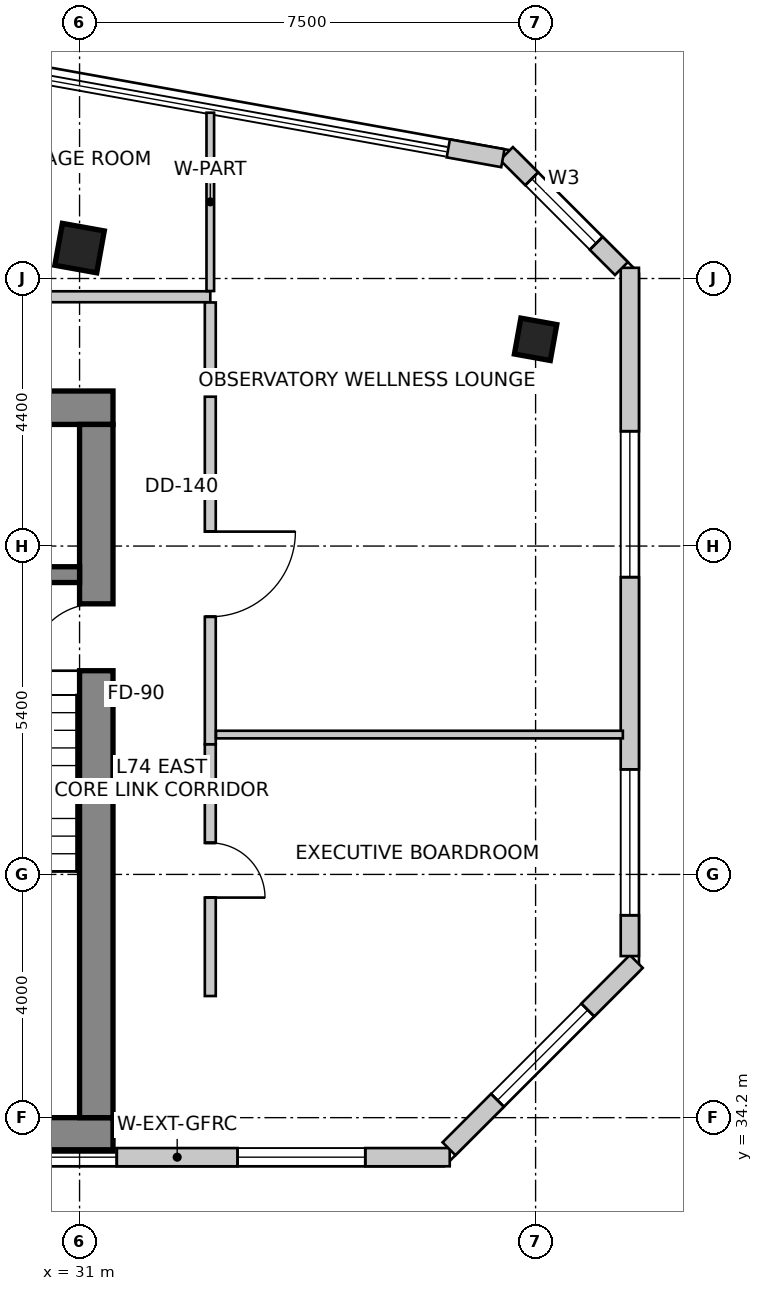
"""IFC4 building model, lengths in metres.
Left out: names, types, materials, properties, quantities, classifications, styles, units other than length and angle.
Written with IfcOpenShell. Run it as: python <this file> out.ifc"""

import sys

from ifc_helpers import new_model, si_unit, direction, frame, frame_2d, origin, origin_2d, place, context, subcontext, project, spatial, rectangle, extrude, source, transform, mapped, element, fill, save


model = new_model("IFC4")
c1 = context("Model", 3, precision=1e-05, world=origin(), true_north=direction((0.0, 1.0)))
c2 = subcontext(c1, "Body", "Model", "MODEL_VIEW")
j1 = project(units=[si_unit("LENGTHUNIT", "METRE"), si_unit("PLANEANGLEUNIT", "RADIAN")], contexts=[c1])
p1 = place(None, origin())
s1 = spatial("IfcSite", under=j1, at=p1, CompositionType="ELEMENT")
p2 = place(p1, origin())
s2 = spatial("IfcBuilding", under=s1, at=p2, CompositionType="ELEMENT")
p3 = place(p2, frame((0.0, 0.0, 288.9)))
s3 = spatial("IfcBuildingStorey", under=s2, at=p3, CompositionType="ELEMENT", Elevation=288.9)
p4 = place(p3, frame((16.05, 45.875, 0.0), z_axis=(0.0, 0.0, 1.0), x_axis=(1.0, 0.0, 0.0)))
e1 = element("IfcWall", 1, at=p4, inside=s3, PredefinedType="SHEAR", context=c2, shape_type="SweptSolid", body=[
    extrude(rectangle(XDim=15.5, YDim=0.55, at=frame_2d((7.75, 0.0))), origin(), (0.0, 0.0, 1.0), 3.6),
])
p5 = place(p3, frame((16.05, 33.925, 0.0), z_axis=(0.0, 0.0, 1.0), x_axis=(1.0, 0.0, 0.0)))
e2 = element("IfcWall", 2, at=p5, inside=s3, PredefinedType="SHEAR", context=c2, shape_type="SweptSolid", body=[
    extrude(rectangle(XDim=15.5, YDim=0.55, at=frame_2d((7.75, 0.0))), origin(), (0.0, 0.0, 1.0), 3.6),
])
m1 = source(origin(), c2, "Body", "SweptSolid", [
    extrude(rectangle(XDim=1.1, YDim=2.15, at=frame_2d((0.55, 1.075))), frame((0.0, 0.285, 0.0), z_axis=(0.0, -1.0, 0.0), x_axis=(1.0, 0.0, 0.0)), (0.0, 0.0, 1.0), 0.57),
])
p6 = place(p5, frame((9.98, 0.0, 0.0)))
e3 = element("IfcOpeningElement", 3, at=p6, cuts=e2, PredefinedType="OPENING", context=c2, shape_type="MappedRepresentation", body=[
    mapped(m1, transform((0.0, 0.0, 0.0), scale=1.0)),
])
p7 = place(p3, frame((31.275, 34.2, 0.0), z_axis=(0.0, 0.0, 1.0), x_axis=(0.0, 1.0, 0.0)))
e4 = element("IfcWall", 4, at=p7, inside=s3, PredefinedType="SHEAR", context=c2, shape_type="SweptSolid", body=[
    extrude(rectangle(XDim=11.4, YDim=0.55, at=frame_2d((5.7, 0.0))), origin(), (0.0, 0.0, 1.0), 3.6),
])
p8 = place(p7, frame((7.35, 0.0, 0.0)))
e5 = element("IfcOpeningElement", 5, at=p8, cuts=e4, PredefinedType="OPENING", context=c2, shape_type="MappedRepresentation", body=[
    mapped(m1, transform((0.0, 0.0, 0.0), scale=1.0)),
])
p9 = place(p3, frame((27.5, 43.13, 0.0), z_axis=(0.0, 0.0, 1.0), x_axis=(1.0, 0.0, 0.0)))
e6 = element("IfcWall", 6, at=p9, inside=s3, PredefinedType="SHEAR", context=c2, shape_type="SweptSolid", body=[
    extrude(rectangle(XDim=3.5, YDim=0.26, at=frame_2d((1.75, 0.0))), origin(), (0.0, 0.0, 1.0), 3.6),
])
m2 = source(origin(), c2, "Body", "SweptSolid", [
    extrude(rectangle(XDim=0.7, YDim=0.7, at=origin_2d()), origin(), (0.0, 0.0, 1.0), 3.6),
])
p10 = place(p3, frame((31.0, 48.5, 0.0), z_axis=(0.0, 0.0, 1.0), x_axis=(0.984195607969, -0.17708474032, 0.0)))
e7 = element("IfcColumn", 7, at=p10, inside=s3, PredefinedType="COLUMN", context=c2, shape_type="MappedRepresentation", body=[
    mapped(m2, transform((0.0, 0.0, 0.0), scale=1.0)),
])
m3 = source(origin(), c2, "Body", "SweptSolid", [
    extrude(rectangle(XDim=0.6, YDim=0.6, at=origin_2d()), origin(), (0.0, 0.0, 1.0), 3.6),
])
p11 = place(p3, frame((38.5, 47.0, 0.0), z_axis=(0.0, 0.0, 1.0), x_axis=(0.984195607969, -0.17708474032, 0.0)))
e8 = element("IfcColumn", 8, at=p11, inside=s3, PredefinedType="COLUMN", context=c2, shape_type="MappedRepresentation", body=[
    mapped(m3, transform((0.0, 0.0, 0.0), scale=1.0)),
])
p12 = place(p3, frame((27.973, 33.55, 0.0), z_axis=(0.0, 0.0, 1.0), x_axis=(1.0, 0.0, 0.0)))
e9 = element("IfcWall", 9, at=p12, inside=s3, PredefinedType="SOLIDWALL", context=c2, shape_type="SweptSolid", body=[
    extrude(rectangle(XDim=9.115, YDim=0.3, at=frame_2d((4.558, 0.0))), origin(), (0.0, 0.0, 1.0), 3.35),
])
m4 = source(origin(), c2, "Body", "SweptSolid", [
    extrude(rectangle(XDim=2.4, YDim=2.2, at=frame_2d((1.2, 1.1))), frame((0.0, 0.16, 0.0), z_axis=(0.0, -1.0, 0.0), x_axis=(1.0, 0.0, 0.0)), (0.0, 0.0, 1.0), 0.32),
])
p13 = place(p12, frame((1.239, 0.0, 0.85)))
e10 = element("IfcOpeningElement", 10, at=p13, cuts=e9, PredefinedType="OPENING", context=c2, shape_type="MappedRepresentation", body=[
    mapped(m4, transform((0.0, 0.0, 0.0), scale=1.0)),
])
m5 = source(origin(), c2, "Body", "SweptSolid", [
    extrude(rectangle(XDim=2.1, YDim=2.0, at=frame_2d((1.05, 1.0))), frame((0.0, 0.16, 0.0), z_axis=(0.0, -1.0, 0.0), x_axis=(1.0, 0.0, 0.0)), (0.0, 0.0, 1.0), 0.32),
])
p14 = place(p12, frame((5.626, 0.0, 0.85)))
e11 = element("IfcOpeningElement", 11, at=p14, cuts=e9, PredefinedType="OPENING", context=c2, shape_type="MappedRepresentation", body=[
    mapped(m5, transform((0.0, 0.0, 0.0), scale=1.0)),
])
p15 = place(p3, frame((37.076, 33.688, 0.0), z_axis=(0.0, 0.0, 1.0), x_axis=(0.707078757535, 0.707134803727, 0.0)))
e12 = element("IfcWall", 12, at=p15, inside=s3, PredefinedType="SOLIDWALL", context=c2, shape_type="SweptSolid", body=[
    extrude(rectangle(XDim=4.356, YDim=0.3, at=frame_2d((2.178, 0.0))), origin(), (0.0, 0.0, 1.0), 3.35),
])
p16 = place(p15, frame((1.128, 0.0, 0.85)))
e13 = element("IfcOpeningElement", 13, at=p16, cuts=e12, PredefinedType="OPENING", context=c2, shape_type="MappedRepresentation", body=[
    mapped(m5, transform((0.0, 0.0, 0.0), scale=1.0)),
])
p17 = place(p3, frame((40.05, 36.857, 0.0), z_axis=(0.0, 0.0, 1.0), x_axis=(0.0, 1.0, 0.0)))
e14 = element("IfcWall", 14, at=p17, inside=s3, PredefinedType="SOLIDWALL", context=c2, shape_type="SweptSolid", body=[
    extrude(rectangle(XDim=11.318, YDim=0.3, at=frame_2d((5.659, 0.0))), origin(), (0.0, 0.0, 1.0), 3.35),
])
p18 = place(p17, frame((0.671, 0.0, 0.85)))
e15 = element("IfcOpeningElement", 15, at=p18, cuts=e14, PredefinedType="OPENING", context=c2, shape_type="MappedRepresentation", body=[
    mapped(m4, transform((0.0, 0.0, 0.0), scale=1.0)),
])
p19 = place(p17, frame((6.231, 0.0, 0.85)))
e16 = element("IfcOpeningElement", 16, at=p19, cuts=e14, PredefinedType="OPENING", context=c2, shape_type="MappedRepresentation", body=[
    mapped(m4, transform((0.0, 0.0, 0.0), scale=1.0)),
])
p20 = place(p3, frame((39.912, 48.164, 0.0), z_axis=(0.0, 0.0, 1.0), x_axis=(-0.70715242601, 0.707061133417, 0.0)))
e17 = element("IfcWall", 17, at=p20, inside=s3, PredefinedType="SOLIDWALL", context=c2, shape_type="SweptSolid", body=[
    extrude(rectangle(XDim=2.674, YDim=0.3, at=frame_2d((1.337, 0.0))), origin(), (0.0, 0.0, 1.0), 3.35),
])
m6 = source(origin(), c2, "Body", "SweptSolid", [
    extrude(rectangle(XDim=1.5, YDim=1.8, at=frame_2d((0.75, 0.9))), frame((0.0, 0.16, 0.0), z_axis=(0.0, -1.0, 0.0), x_axis=(1.0, 0.0, 0.0)), (0.0, 0.0, 1.0), 0.32),
])
p21 = place(p20, frame((0.587, 0.0, 0.85)))
e18 = element("IfcOpeningElement", 18, at=p21, cuts=e17, PredefinedType="OPENING", context=c2, shape_type="MappedRepresentation", body=[
    mapped(m6, transform((0.0, 0.0, 0.0), scale=1.0)),
])
p22 = place(p3, frame((37.962, 49.979, 0.0), z_axis=(0.0, 0.0, 1.0), x_axis=(-0.984215051171, 0.176976645491, 0.0)))
e19 = element("IfcWall", 19, at=p22, inside=s3, PredefinedType="SOLIDWALL", context=c2, shape_type="SweptSolid", body=[
    extrude(rectangle(XDim=0.912, YDim=0.3, at=frame_2d((0.456, 0.0))), origin(), (0.0, 0.0, 1.0), 3.35),
])
p23 = place(p3, frame((28.362, 47.7, 0.0), z_axis=(0.0, 0.0, 1.0), x_axis=(1.0, 0.0, 0.0)))
e20 = element("IfcWall", 20, at=p23, inside=s3, PredefinedType="PARTITIONING", context=c2, shape_type="SweptSolid", body=[
    extrude(rectangle(XDim=4.788, YDim=0.18, at=frame_2d((2.394, 0.0))), origin(), (0.0, 0.0, 1.0), 2.922),
])
m7 = source(origin(), c2, "Body", "SweptSolid", [
    extrude(rectangle(XDim=0.85, YDim=2.15, at=frame_2d((0.425, 1.075))), frame((0.0, 0.1, 0.0), z_axis=(0.0, -1.0, 0.0), x_axis=(1.0, 0.0, 0.0)), (0.0, 0.0, 1.0), 0.2),
])
p24 = place(p23, frame((0.401, 0.0, 0.0)))
e21 = element("IfcOpeningElement", 21, at=p24, cuts=e20, PredefinedType="OPENING", context=c2, shape_type="MappedRepresentation", body=[
    mapped(m7, transform((0.0, 0.0, 0.0), scale=1.0)),
])
p25 = place(p3, frame((33.15, 47.606, 0.0), z_axis=(0.0, 0.0, 1.0), x_axis=(0.0, -1.0, 0.0)))
e22 = element("IfcWall", 22, at=p25, inside=s3, PredefinedType="PARTITIONING", context=c2, shape_type="SweptSolid", body=[
    extrude(rectangle(XDim=1.456, YDim=0.18, at=frame_2d((0.728, 0.0))), origin(), (0.0, 0.0, 1.0), 3.35),
])
p26 = place(p3, frame((33.15, 46.056, 0.0), z_axis=(0.0, 0.0, 1.0), x_axis=(0.0, -1.0, 0.0)))
e23 = element("IfcWall", 23, at=p26, inside=s3, PredefinedType="PARTITIONING", context=c2, shape_type="SweptSolid", body=[
    extrude(rectangle(XDim=5.716, YDim=0.18, at=frame_2d((2.858, 0.0))), origin(), (0.0, 0.0, 1.0), 2.922),
])
m8 = source(origin(), c2, "Body", "SweptSolid", [
    extrude(rectangle(XDim=1.4, YDim=2.15, at=frame_2d((0.7, 1.075))), frame((0.0, 0.1, 0.0), z_axis=(0.0, -1.0, 0.0), x_axis=(1.0, 0.0, 0.0)), (0.0, 0.0, 1.0), 0.2),
])
p27 = place(p26, frame((2.219, 0.0, 0.0)))
e24 = element("IfcOpeningElement", 24, at=p27, cuts=e23, PredefinedType="OPENING", context=c2, shape_type="MappedRepresentation", body=[
    mapped(m8, transform((0.0, 0.0, 0.0), scale=1.0)),
])
p28 = place(p3, frame((33.15, 40.338, 0.0), z_axis=(0.0, 0.0, 1.0), x_axis=(0.0, -1.0, 0.0)))
e25 = element("IfcWall", 25, at=p28, inside=s3, PredefinedType="PARTITIONING", context=c2, shape_type="SweptSolid", body=[
    extrude(rectangle(XDim=4.138, YDim=0.18, at=frame_2d((2.069, 0.0))), origin(), (0.0, 0.0, 1.0), 3.35),
])
m9 = source(origin(), c2, "Body", "SweptSolid", [
    extrude(rectangle(XDim=0.9, YDim=2.15, at=frame_2d((0.45, 1.075))), frame((0.0, 0.1, 0.0), z_axis=(0.0, -1.0, 0.0), x_axis=(1.0, 0.0, 0.0)), (0.0, 0.0, 1.0), 0.2),
])
p29 = place(p28, frame((1.619, 0.0, 0.0)))
e26 = element("IfcOpeningElement", 26, at=p29, cuts=e25, PredefinedType="OPENING", context=c2, shape_type="MappedRepresentation", body=[
    mapped(m9, transform((0.0, 0.0, 0.0), scale=1.0)),
])
p30 = place(p3, frame((33.15, 50.727, 0.0), z_axis=(0.0, 0.0, 1.0), x_axis=(0.0, -1.0, 0.0)))
e27 = element("IfcWall", 27, at=p30, inside=s3, PredefinedType="PARTITIONING", context=c2, shape_type="SweptSolid", body=[
    extrude(rectangle(XDim=2.933, YDim=0.125, at=frame_2d((1.466, 0.0))), origin(), (0.0, 0.0, 1.0), 2.642),
])
p31 = place(p3, frame((39.935, 40.5, 0.0), z_axis=(0.0, 0.0, 1.0), x_axis=(-1.0, 0.0, 0.0)))
e28 = element("IfcWall", 28, at=p31, inside=s3, PredefinedType="PARTITIONING", context=c2, shape_type="SweptSolid", body=[
    extrude(rectangle(XDim=6.691, YDim=0.125, at=frame_2d((3.346, 0.0))), origin(), (0.0, 0.0, 1.0), 3.35),
])
m10 = source(origin(), c2, "Body", "SweptSolid", [
    extrude(rectangle(XDim=2.4, YDim=2.2, at=frame_2d((1.2, 1.1))), frame((0.0, -0.015, 0.0), z_axis=(0.0, -1.0, 0.0), x_axis=(1.0, 0.0, 0.0)), (0.0, 0.0, 1.0), 0.06),
])
p32 = place(p13, origin())
e29 = element("IfcWindow", 29, at=p32, inside=s3, PartitioningType="SINGLE_PANEL", PredefinedType="WINDOW", context=c2, shape_type="MappedRepresentation", body=[
    mapped(m10, transform((0.0, 0.0, 0.0), scale=1.0)),
])
fill(e10, e29)
m11 = source(origin(), c2, "Body", "SweptSolid", [
    extrude(rectangle(XDim=2.1, YDim=2.0, at=frame_2d((1.05, 1.0))), frame((0.0, -0.015, 0.0), z_axis=(0.0, -1.0, 0.0), x_axis=(1.0, 0.0, 0.0)), (0.0, 0.0, 1.0), 0.06),
])
p33 = place(p14, origin())
e30 = element("IfcWindow", 30, at=p33, inside=s3, PartitioningType="SINGLE_PANEL", PredefinedType="WINDOW", context=c2, shape_type="MappedRepresentation", body=[
    mapped(m11, transform((0.0, 0.0, 0.0), scale=1.0)),
])
fill(e11, e30)
p34 = place(p16, origin())
e31 = element("IfcWindow", 31, at=p34, inside=s3, PartitioningType="SINGLE_PANEL", PredefinedType="WINDOW", context=c2, shape_type="MappedRepresentation", body=[
    mapped(m11, transform((0.0, 0.0, 0.0), scale=1.0)),
])
fill(e13, e31)
p35 = place(p18, origin())
e32 = element("IfcWindow", 32, at=p35, inside=s3, PartitioningType="SINGLE_PANEL", PredefinedType="WINDOW", context=c2, shape_type="MappedRepresentation", body=[
    mapped(m10, transform((0.0, 0.0, 0.0), scale=1.0)),
])
fill(e15, e32)
p36 = place(p19, origin())
e33 = element("IfcWindow", 33, at=p36, inside=s3, PartitioningType="SINGLE_PANEL", PredefinedType="WINDOW", context=c2, shape_type="MappedRepresentation", body=[
    mapped(m10, transform((0.0, 0.0, 0.0), scale=1.0)),
])
fill(e16, e33)
m12 = source(origin(), c2, "Body", "SweptSolid", [
    extrude(rectangle(XDim=1.5, YDim=1.8, at=frame_2d((0.75, 0.9))), frame((0.0, -0.015, 0.0), z_axis=(0.0, -1.0, 0.0), x_axis=(1.0, 0.0, 0.0)), (0.0, 0.0, 1.0), 0.06),
])
p37 = place(p21, origin())
e34 = element("IfcWindow", 34, at=p37, inside=s3, PartitioningType="SINGLE_PANEL", PredefinedType="WINDOW", context=c2, shape_type="MappedRepresentation", body=[
    mapped(m12, transform((0.0, 0.0, 0.0), scale=1.0)),
])
fill(e18, e34)
m13 = source(origin(), c2, "Body", "SweptSolid", [
    extrude(rectangle(XDim=1.1, YDim=2.15, at=frame_2d((0.55, 1.075))), frame((0.0, 0.025, 0.0), z_axis=(0.0, -1.0, 0.0), x_axis=(1.0, 0.0, 0.0)), (0.0, 0.0, 1.0), 0.05),
])
p38 = place(p8, origin())
e35 = element("IfcDoor", 35, at=p38, inside=s3, OperationType="SINGLE_SWING_LEFT", PredefinedType="DOOR", context=c2, shape_type="MappedRepresentation", body=[
    mapped(m13, transform((0.0, 0.0, 0.0), scale=1.0)),
])
fill(e5, e35)
m14 = source(origin(), c2, "Body", "SweptSolid", [
    extrude(rectangle(XDim=1.4, YDim=2.15, at=frame_2d((0.7, 1.075))), frame((0.0, 0.025, 0.0), z_axis=(0.0, -1.0, 0.0), x_axis=(1.0, 0.0, 0.0)), (0.0, 0.0, 1.0), 0.05),
])
p39 = place(p27, origin())
e36 = element("IfcDoor", 36, at=p39, inside=s3, OperationType="SINGLE_SWING_LEFT", PredefinedType="DOOR", context=c2, shape_type="MappedRepresentation", body=[
    mapped(m14, transform((0.0, 0.0, 0.0), scale=1.0)),
])
fill(e24, e36)
m15 = source(origin(), c2, "Body", "SweptSolid", [
    extrude(rectangle(XDim=0.9, YDim=2.15, at=frame_2d((0.45, 1.075))), frame((0.0, 0.025, 0.0), z_axis=(0.0, -1.0, 0.0), x_axis=(1.0, 0.0, 0.0)), (0.0, 0.0, 1.0), 0.05),
])
p40 = place(p29, origin())
e37 = element("IfcDoor", 37, at=p40, inside=s3, OperationType="SINGLE_SWING_RIGHT", PredefinedType="DOOR", context=c2, shape_type="MappedRepresentation", body=[
    mapped(m15, transform((0.0, 0.0, 0.0), scale=1.0)),
])
fill(e26, e37)
save(model, sys.argv[1])
